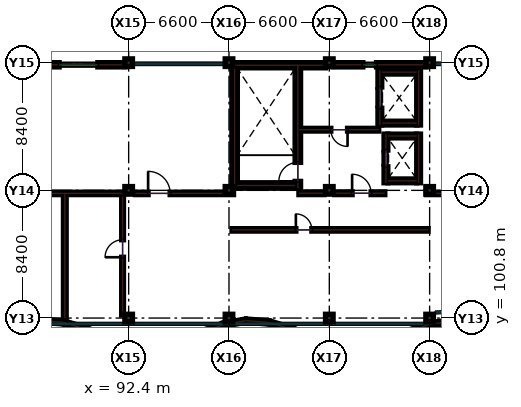
"""IFC4 building model, lengths in metres.
Left out: names, types, materials, properties, quantities, classifications, styles, units other than length and angle.
Written with IfcOpenShell. Run it as: python <this file> out.ifc"""

import sys

from ifc_helpers import new_model, si_unit, direction, frame, frame_2d, origin, origin_2d, place, context, subcontext, project, spatial, rectangle, extrude, element, fill, save


model = new_model("IFC4")
c1 = context("Model", 3, precision=1e-05, world=origin(), true_north=direction((0.0, 1.0)))
c2 = subcontext(c1, "Body", "Model", "MODEL_VIEW")
j1 = project(units=[si_unit("LENGTHUNIT", "METRE"), si_unit("PLANEANGLEUNIT", "RADIAN")], contexts=[c1])
p1 = place(None, origin())
s1 = spatial("IfcSite", under=j1, at=p1, CompositionType="ELEMENT")
p2 = place(p1, origin())
s2 = spatial("IfcBuilding", under=s1, at=p2, CompositionType="ELEMENT")
p3 = place(p2, frame((0.0, 0.0, 22.8)))
s3 = spatial("IfcBuildingStorey", under=s2, at=p3, CompositionType="ELEMENT", Elevation=22.8)
for number, where, z_axis, x_axis in (
    (1, (92.4, 100.8, 0.0), (0.0, 0.0, 1.0), (1.0, 0.0, 0.0)),
    (2, (92.4, 109.2, 0.0), (0.0, 0.0, 1.0), (1.0, 0.0, 0.0)),
    (3, (92.4, 117.6, 0.0), (0.0, 0.0, 1.0), (1.0, 0.0, 0.0)),
    (4, (99.0, 100.8, 0.0), (0.0, 0.0, 1.0), (1.0, 0.0, 0.0)),
    (5, (99.0, 109.2, 0.0), (0.0, 0.0, 1.0), (1.0, 0.0, 0.0)),
    (6, (99.0, 117.6, 0.0), (0.0, 0.0, 1.0), (1.0, 0.0, 0.0)),
    (7, (105.6, 100.8, 0.0), (0.0, 0.0, 1.0), (1.0, 0.0, 0.0)),
    (8, (105.6, 109.2, 0.0), (0.0, 0.0, 1.0), (1.0, 0.0, 0.0)),
    (9, (105.6, 117.6, 0.0), (0.0, 0.0, 1.0), (1.0, 0.0, 0.0)),
    (10, (112.2, 100.8, 0.0), (0.0, 0.0, 1.0), (1.0, 0.0, 0.0)),
    (11, (112.2, 109.2, 0.0), (0.0, 0.0, 1.0), (1.0, 0.0, 0.0)),
    (12, (112.2, 117.6, 0.0), (0.0, 0.0, 1.0), (1.0, 0.0, 0.0)),
):
    element("IfcColumn", number, at=place(p3, frame(where, z_axis=z_axis, x_axis=x_axis)), inside=s3, PredefinedType="COLUMN", context=c2, shape_type="SweptSolid", body=[
        extrude(rectangle(XDim=0.5, YDim=0.5, at=origin_2d()), origin(), (0.0, 0.0, 1.0), 4.2),
    ])
p4 = place(p3, frame((86.25, 109.0, 0.0), z_axis=(0.0, 0.0, 1.0), x_axis=(1.0, 0.0, 0.0)))
e13 = element("IfcWall", 13, at=p4, inside=s3, PredefinedType="PARTITIONING", context=c2, shape_type="SweptSolid", body=[
    extrude(rectangle(XDim=5.7, YDim=0.16, at=frame_2d((2.85, 0.0))), origin(), (0.0, 0.0, 1.0), 3.195),
])
p5 = place(p3, frame((92.85, 109.0, 0.0), z_axis=(0.0, 0.0, 1.0), x_axis=(1.0, 0.0, 0.0)))
e14 = element("IfcWall", 14, at=p5, inside=s3, PredefinedType="PARTITIONING", context=c2, shape_type="SweptSolid", body=[
    extrude(rectangle(XDim=6.45, YDim=0.16, at=frame_2d((3.225, 0.0))), origin(), (0.0, 0.0, 1.0), 3.195),
])
p6 = place(p5, frame((0.83, 0.0, 0.0)))
e15 = element("IfcOpeningElement", 15, at=p6, cuts=e14, PredefinedType="OPENING", context=c2, shape_type="SweptSolid", body=[
    extrude(rectangle(XDim=1.45, YDim=2.25, at=frame_2d((0.725, 1.125))), frame((0.0, 0.09, 0.0), z_axis=(0.0, -1.0, 0.0), x_axis=(1.0, 0.0, 0.0)), (0.0, 0.0, 1.0), 0.18),
])
p7 = place(p3, frame((112.0, 109.0, 0.0), z_axis=(0.0, 0.0, 1.0), x_axis=(1.0, 0.0, 0.0)))
e16 = element("IfcWall", 16, at=p7, inside=s3, PredefinedType="PARTITIONING", context=c2, shape_type="SweptSolid", body=[
    extrude(rectangle(XDim=6.35, YDim=0.16, at=frame_2d((3.175, 0.0))), origin(), (0.0, 0.0, 1.0), 3.195),
])
p8 = place(p7, frame((4.05, 0.0, 0.0)))
e17 = element("IfcOpeningElement", 17, at=p8, cuts=e16, PredefinedType="OPENING", context=c2, shape_type="SweptSolid", body=[
    extrude(rectangle(XDim=1.95, YDim=2.35, at=frame_2d((0.975, 1.175))), frame((0.0, 0.09, 0.0), z_axis=(0.0, -1.0, 0.0), x_axis=(1.0, 0.0, 0.0)), (0.0, 0.0, 1.0), 0.18),
])
p9 = place(p3, frame((88.2, 100.8, 0.0), z_axis=(0.0, 0.0, 1.0), x_axis=(0.0, 1.0, 0.0)))
e18 = element("IfcWall", 18, at=p9, inside=s3, PredefinedType="SOLIDWALL", context=c2, shape_type="SweptSolid", body=[
    extrude(rectangle(XDim=8.2, YDim=0.18, at=frame_2d((4.1, 0.0))), origin(), (0.0, 0.0, 1.0), 3.23),
])
p10 = place(p3, frame((92.0, 101.0, 0.0), z_axis=(0.0, 0.0, 1.0), x_axis=(0.0, 1.0, 0.0)))
e19 = element("IfcWall", 19, at=p10, inside=s3, PredefinedType="PARTITIONING", context=c2, shape_type="SweptSolid", body=[
    extrude(rectangle(XDim=8.0, YDim=0.12, at=frame_2d((4.0, 0.0))), origin(), (0.0, 0.0, 1.0), 3.23),
])
p11 = place(p10, frame((3.8, 0.0, 0.0)))
e20 = element("IfcOpeningElement", 20, at=p11, cuts=e19, PredefinedType="OPENING", context=c2, shape_type="SweptSolid", body=[
    extrude(rectangle(XDim=1.15, YDim=2.2, at=frame_2d((0.575, 1.1))), frame((0.0, 0.07, 0.0), z_axis=(0.0, -1.0, 0.0), x_axis=(1.0, 0.0, 0.0)), (0.0, 0.0, 1.0), 0.14),
])
p12 = place(p3, frame((99.2, 106.6, 0.0), z_axis=(0.0, 0.0, 1.0), x_axis=(1.0, 0.0, 0.0)))
e21 = element("IfcWall", 21, at=p12, inside=s3, PredefinedType="PARTITIONING", context=c2, shape_type="SweptSolid", body=[
    extrude(rectangle(XDim=12.9, YDim=0.16, at=frame_2d((6.45, 0.0))), origin(), (0.0, 0.0, 1.0), 3.23),
])
p13 = place(p12, frame((4.2, 0.0, 0.0)))
e22 = element("IfcOpeningElement", 22, at=p13, cuts=e21, PredefinedType="OPENING", context=c2, shape_type="SweptSolid", body=[
    extrude(rectangle(XDim=1.05, YDim=2.15, at=frame_2d((0.525, 1.075))), frame((0.0, 0.09, 0.0), z_axis=(0.0, -1.0, 0.0), x_axis=(1.0, 0.0, 0.0)), (0.0, 0.0, 1.0), 0.18),
])
p14 = place(p3, frame((92.155, 117.46, 0.0), z_axis=(0.0, 0.0, 1.0), x_axis=(-1.0, 0.0, 0.0)))
e23 = element("IfcWall", 23, at=p14, inside=s3, PredefinedType="SOLIDWALL", context=c2, shape_type="SweptSolid", body=[
    extrude(rectangle(XDim=6.11, YDim=0.28, at=frame_2d((3.055, 0.0))), origin(), (0.0, 0.0, 1.0), 3.345),
])
p15 = place(p14, frame((1.78, 0.0, 0.95)))
e24 = element("IfcOpeningElement", 24, at=p15, cuts=e23, PredefinedType="OPENING", context=c2, shape_type="SweptSolid", body=[
    extrude(rectangle(XDim=2.55, YDim=1.65, at=frame_2d((1.275, 0.825))), frame((0.0, 0.15, 0.0), z_axis=(0.0, -1.0, 0.0), x_axis=(1.0, 0.0, 0.0)), (0.0, 0.0, 1.0), 0.3),
])
p16 = place(p3, frame((105.355, 117.43, 0.0), z_axis=(0.0, 0.0, 1.0), x_axis=(-1.0, 0.0, 0.0)))
e25 = element("IfcWall", 25, at=p16, inside=s3, PredefinedType="SHEAR", context=c2, shape_type="SweptSolid", body=[
    extrude(rectangle(XDim=6.11, YDim=0.34, at=frame_2d((3.055, 0.0))), origin(), (0.0, 0.0, 1.0), 3.98),
])
p17 = place(p3, frame((111.955, 117.46, 0.0), z_axis=(0.0, 0.0, 1.0), x_axis=(-1.0, 0.0, 0.0)))
e26 = element("IfcWall", 26, at=p17, inside=s3, PredefinedType="SOLIDWALL", context=c2, shape_type="SweptSolid", body=[
    extrude(rectangle(XDim=6.11, YDim=0.28, at=frame_2d((3.055, 0.0))), origin(), (0.0, 0.0, 1.0), 3.345),
])
p18 = place(p17, frame((3.25, 0.0, 0.95)))
e27 = element("IfcOpeningElement", 27, at=p18, cuts=e26, PredefinedType="OPENING", context=c2, shape_type="SweptSolid", body=[
    extrude(rectangle(XDim=0.9, YDim=1.4, at=frame_2d((0.45, 0.7))), frame((0.0, 0.15, 0.0), z_axis=(0.0, -1.0, 0.0), x_axis=(1.0, 0.0, 0.0)), (0.0, 0.0, 1.0), 0.3),
])
p19 = place(p3, frame((86.565, 100.63, 0.0), z_axis=(0.0, 0.0, 1.0), x_axis=(0.997363695451, -0.072564860623, 0.0)))
e28 = element("IfcWall", 28, at=p19, inside=s3, PredefinedType="SOLIDWALL", context=c2, shape_type="SweptSolid", body=[
    extrude(rectangle(XDim=1.514, YDim=0.22, at=frame_2d((0.757, 0.0))), origin(), (0.0, 0.0, 1.0), 1.45),
])
p20 = place(p3, frame((88.105, 100.515, 0.0), z_axis=(0.0, 0.0, 1.0), x_axis=(0.958103864289, -0.286420993006, 0.0)))
e29 = element("IfcWall", 29, at=p20, inside=s3, PredefinedType="SOLIDWALL", context=c2, shape_type="SweptSolid", body=[
    extrude(rectangle(XDim=1.571, YDim=0.22, at=frame_2d((0.786, 0.0))), origin(), (0.0, 0.0, 1.0), 1.45),
])
p21 = place(p3, frame((97.07, 99.81, 0.0), z_axis=(0.0, 0.0, 1.0), x_axis=(0.941593715183, 0.336751058688, 0.0)))
e30 = element("IfcWall", 30, at=p21, inside=s3, PredefinedType="SOLIDWALL", context=c2, shape_type="SweptSolid", body=[
    extrude(rectangle(XDim=1.604, YDim=0.22, at=frame_2d((0.802, 0.0))), origin(), (0.0, 0.0, 1.0), 1.45),
])
p22 = place(p3, frame((98.6, 100.36, 0.0), z_axis=(0.0, 0.0, 1.0), x_axis=(0.984308919427, 0.176453821539, 0.0)))
e31 = element("IfcWall", 31, at=p22, inside=s3, PredefinedType="SOLIDWALL", context=c2, shape_type="SweptSolid", body=[
    extrude(rectangle(XDim=1.529, YDim=0.22, at=frame_2d((0.764, 0.0))), origin(), (0.0, 0.0, 1.0), 1.45),
])
p23 = place(p3, frame((100.14, 100.63, 0.0), z_axis=(0.0, 0.0, 1.0), x_axis=(0.996591169262, -0.082498735434, 0.0)))
e32 = element("IfcWall", 32, at=p23, inside=s3, PredefinedType="SOLIDWALL", context=c2, shape_type="SweptSolid", body=[
    extrude(rectangle(XDim=1.515, YDim=0.22, at=frame_2d((0.758, 0.0))), origin(), (0.0, 0.0, 1.0), 1.45),
])
p24 = place(p3, frame((101.68, 100.5, 0.0), z_axis=(0.0, 0.0, 1.0), x_axis=(0.95569544679, -0.294357287977, 0.0)))
e33 = element("IfcWall", 33, at=p24, inside=s3, PredefinedType="SOLIDWALL", context=c2, shape_type="SweptSolid", body=[
    extrude(rectangle(XDim=1.58, YDim=0.22, at=frame_2d((0.79, 0.0))), origin(), (0.0, 0.0, 1.0), 1.45),
])
p25 = place(p3, frame((110.645, 99.84, 0.0), z_axis=(0.0, 0.0, 1.0), x_axis=(0.943560676249, 0.331199713522, 0.0)))
e34 = element("IfcWall", 34, at=p25, inside=s3, PredefinedType="SOLIDWALL", context=c2, shape_type="SweptSolid", body=[
    extrude(rectangle(XDim=1.6, YDim=0.22, at=frame_2d((0.8, 0.0))), origin(), (0.0, 0.0, 1.0), 1.45),
])
p26 = place(p3, frame((112.18, 100.38, 0.0), z_axis=(0.0, 0.0, 1.0), x_axis=(0.990109991905, 0.140293278275, 0.0)))
e35 = element("IfcWall", 35, at=p26, inside=s3, PredefinedType="SOLIDWALL", context=c2, shape_type="SweptSolid", body=[
    extrude(rectangle(XDim=2.424, YDim=0.22, at=frame_2d((1.212, 0.0))), origin(), (0.0, 0.0, 1.0), 1.45),
])
p27 = place(p3, frame((99.37, 109.34, 0.0), z_axis=(0.0, 0.0, 1.0), x_axis=(0.0, 1.0, 0.0)))
e36 = element("IfcWall", 36, at=p27, inside=s3, PredefinedType="SHEAR", context=c2, shape_type="SweptSolid", body=[
    extrude(rectangle(XDim=8.09, YDim=0.36, at=frame_2d((4.045, 0.0))), origin(), (0.0, 0.0, 1.0), 3.96),
])
p28 = place(p3, frame((103.53, 109.34, 0.0), z_axis=(0.0, 0.0, 1.0), x_axis=(0.0, 1.0, 0.0)))
e37 = element("IfcWall", 37, at=p28, inside=s3, PredefinedType="SHEAR", context=c2, shape_type="SweptSolid", body=[
    extrude(rectangle(XDim=8.09, YDim=0.36, at=frame_2d((4.045, 0.0))), origin(), (0.0, 0.0, 1.0), 3.96),
])
p29 = place(p28, frame((0.45, 0.0, 0.0)))
e38 = element("IfcOpeningElement", 38, at=p29, cuts=e37, PredefinedType="OPENING", context=c2, shape_type="SweptSolid", body=[
    extrude(rectangle(XDim=1.25, YDim=2.15, at=frame_2d((0.625, 1.075))), frame((0.0, 0.19, 0.0), z_axis=(0.0, -1.0, 0.0), x_axis=(1.0, 0.0, 0.0)), (0.0, 0.0, 1.0), 0.38),
])
p30 = place(p3, frame((99.55, 109.52, 0.0), z_axis=(0.0, 0.0, 1.0), x_axis=(1.0, 0.0, 0.0)))
e39 = element("IfcWall", 39, at=p30, inside=s3, PredefinedType="SHEAR", context=c2, shape_type="SweptSolid", body=[
    extrude(rectangle(XDim=3.8, YDim=0.36, at=frame_2d((1.9, 0.0))), origin(), (0.0, 0.0, 1.0), 3.96),
])
p31 = place(p3, frame((109.325, 109.7, 0.0), z_axis=(0.0, 0.0, 1.0), x_axis=(0.0, 1.0, 0.0)))
e40 = element("IfcWall", 40, at=p31, inside=s3, PredefinedType="SHEAR", context=c2, shape_type="SweptSolid", body=[
    extrude(rectangle(XDim=3.2, YDim=0.25, at=frame_2d((1.6, 0.0))), origin(), (0.0, 0.0, 1.0), 3.96),
])
p32 = place(p31, frame((1.05, 0.0, 0.0)))
e41 = element("IfcOpeningElement", 41, at=p32, cuts=e40, PredefinedType="OPENING", context=c2, shape_type="SweptSolid", body=[
    extrude(rectangle(XDim=1.1, YDim=2.15, at=frame_2d((0.55, 1.075))), frame((0.0, 0.135, 0.0), z_axis=(0.0, -1.0, 0.0), x_axis=(1.0, 0.0, 0.0)), (0.0, 0.0, 1.0), 0.27),
])
p33 = place(p3, frame((111.475, 109.7, 0.0), z_axis=(0.0, 0.0, 1.0), x_axis=(0.0, 1.0, 0.0)))
e42 = element("IfcWall", 42, at=p33, inside=s3, PredefinedType="SHEAR", context=c2, shape_type="SweptSolid", body=[
    extrude(rectangle(XDim=3.2, YDim=0.25, at=frame_2d((1.6, 0.0))), origin(), (0.0, 0.0, 1.0), 3.96),
])
for number, where, z_axis, x_axis in (
    (43, (109.45, 109.825, 0.0), (0.0, 0.0, 1.0), (1.0, 0.0, 0.0)),
    (44, (109.45, 112.775, 0.0), (0.0, 0.0, 1.0), (1.0, 0.0, 0.0)),
):
    element("IfcWall", number, at=place(p3, frame(where, z_axis=z_axis, x_axis=x_axis)), inside=s3, PredefinedType="SHEAR", context=c2, shape_type="SweptSolid", body=[
        extrude(rectangle(XDim=1.9, YDim=0.25, at=frame_2d((0.95, 0.0))), origin(), (0.0, 0.0, 1.0), 3.96),
    ])
p34 = place(p3, frame((108.925, 113.5, 0.0), z_axis=(0.0, 0.0, 1.0), x_axis=(0.0, 1.0, 0.0)))
e45 = element("IfcWall", 45, at=p34, inside=s3, PredefinedType="SHEAR", context=c2, shape_type="SweptSolid", body=[
    extrude(rectangle(XDim=3.6, YDim=0.25, at=frame_2d((1.8, 0.0))), origin(), (0.0, 0.0, 1.0), 3.96),
])
p35 = place(p34, frame((1.1, 0.0, 0.0)))
e46 = element("IfcOpeningElement", 46, at=p35, cuts=e45, PredefinedType="OPENING", context=c2, shape_type="SweptSolid", body=[
    extrude(rectangle(XDim=1.4, YDim=2.2, at=frame_2d((0.7, 1.1))), frame((0.0, 0.135, 0.0), z_axis=(0.0, -1.0, 0.0), x_axis=(1.0, 0.0, 0.0)), (0.0, 0.0, 1.0), 0.27),
])
p36 = place(p3, frame((111.475, 113.5, 0.0), z_axis=(0.0, 0.0, 1.0), x_axis=(0.0, 1.0, 0.0)))
e47 = element("IfcWall", 47, at=p36, inside=s3, PredefinedType="SHEAR", context=c2, shape_type="SweptSolid", body=[
    extrude(rectangle(XDim=3.6, YDim=0.25, at=frame_2d((1.8, 0.0))), origin(), (0.0, 0.0, 1.0), 3.96),
])
for number, where, z_axis, x_axis in (
    (48, (109.05, 113.625, 0.0), (0.0, 0.0, 1.0), (1.0, 0.0, 0.0)),
    (49, (109.05, 116.975, 0.0), (0.0, 0.0, 1.0), (1.0, 0.0, 0.0)),
):
    element("IfcWall", number, at=place(p3, frame(where, z_axis=z_axis, x_axis=x_axis)), inside=s3, PredefinedType="SHEAR", context=c2, shape_type="SweptSolid", body=[
        extrude(rectangle(XDim=2.3, YDim=0.25, at=frame_2d((1.15, 0.0))), origin(), (0.0, 0.0, 1.0), 3.96),
    ])
p37 = place(p3, frame((103.6, 109.01, 0.0), z_axis=(0.0, 0.0, 1.0), x_axis=(1.0, 0.0, 0.0)))
e50 = element("IfcWall", 50, at=p37, inside=s3, PredefinedType="SOLIDWALL", context=c2, shape_type="SweptSolid", body=[
    extrude(rectangle(XDim=1.65, YDim=0.18, at=frame_2d((0.825, 0.0))), origin(), (0.0, 0.0, 1.0), 3.195),
])
p38 = place(p3, frame((105.95, 109.01, 0.0), z_axis=(0.0, 0.0, 1.0), x_axis=(1.0, 0.0, 0.0)))
e51 = element("IfcWall", 51, at=p38, inside=s3, PredefinedType="SOLIDWALL", context=c2, shape_type="SweptSolid", body=[
    extrude(rectangle(XDim=3.3, YDim=0.18, at=frame_2d((1.65, 0.0))), origin(), (0.0, 0.0, 1.0), 3.195),
])
p39 = place(p38, frame((1.15, 0.0, 0.0)))
e52 = element("IfcOpeningElement", 52, at=p39, cuts=e51, PredefinedType="OPENING", context=c2, shape_type="SweptSolid", body=[
    extrude(rectangle(XDim=1.25, YDim=2.15, at=frame_2d((0.625, 1.075))), frame((0.0, 0.1, 0.0), z_axis=(0.0, -1.0, 0.0), x_axis=(1.0, 0.0, 0.0)), (0.0, 0.0, 1.0), 0.2),
])
p40 = place(p3, frame((103.6, 113.19, 0.0), z_axis=(0.0, 0.0, 1.0), x_axis=(1.0, 0.0, 0.0)))
e53 = element("IfcWall", 53, at=p40, inside=s3, PredefinedType="SOLIDWALL", context=c2, shape_type="SweptSolid", body=[
    extrude(rectangle(XDim=5.25, YDim=0.18, at=frame_2d((2.625, 0.0))), origin(), (0.0, 0.0, 1.0), 3.96),
])
p41 = place(p40, frame((2.1, 0.0, 0.0)))
e54 = element("IfcOpeningElement", 54, at=p41, cuts=e53, PredefinedType="OPENING", context=c2, shape_type="SweptSolid", body=[
    extrude(rectangle(XDim=1.1, YDim=2.15, at=frame_2d((0.55, 1.075))), frame((0.0, 0.1, 0.0), z_axis=(0.0, -1.0, 0.0), x_axis=(1.0, 0.0, 0.0)), (0.0, 0.0, 1.0), 0.2),
])
p42 = place(p6, origin())
e55 = element("IfcDoor", 55, at=p42, inside=s3, OperationType="SINGLE_SWING_LEFT", PredefinedType="DOOR", context=c2, shape_type="SweptSolid", body=[
    extrude(rectangle(XDim=1.45, YDim=2.25, at=frame_2d((0.725, 1.125))), frame((0.0, 0.025, 0.0), z_axis=(0.0, -1.0, 0.0), x_axis=(1.0, 0.0, 0.0)), (0.0, 0.0, 1.0), 0.05),
])
fill(e15, e55)
p43 = place(p11, origin())
e56 = element("IfcDoor", 56, at=p43, inside=s3, OperationType="SINGLE_SWING_LEFT", PredefinedType="DOOR", context=c2, shape_type="SweptSolid", body=[
    extrude(rectangle(XDim=1.15, YDim=2.2, at=frame_2d((0.575, 1.1))), frame((0.0, 0.025, 0.0), z_axis=(0.0, -1.0, 0.0), x_axis=(1.0, 0.0, 0.0)), (0.0, 0.0, 1.0), 0.05),
])
fill(e20, e56)
p44 = place(p13, origin())
e57 = element("IfcDoor", 57, at=p44, inside=s3, OperationType="SINGLE_SWING_LEFT", PredefinedType="DOOR", context=c2, shape_type="SweptSolid", body=[
    extrude(rectangle(XDim=1.05, YDim=2.15, at=frame_2d((0.525, 1.075))), frame((0.0, 0.025, 0.0), z_axis=(0.0, -1.0, 0.0), x_axis=(1.0, 0.0, 0.0)), (0.0, 0.0, 1.0), 0.05),
])
fill(e22, e57)
p45 = place(p15, origin())
e58 = element("IfcWindow", 58, at=p45, inside=s3, PartitioningType="SINGLE_PANEL", PredefinedType="WINDOW", context=c2, shape_type="SweptSolid", body=[
    extrude(rectangle(XDim=2.55, YDim=1.65, at=frame_2d((1.275, 0.825))), frame((0.0, 0.03, 0.0), z_axis=(0.0, -1.0, 0.0), x_axis=(1.0, 0.0, 0.0)), (0.0, 0.0, 1.0), 0.06),
])
fill(e24, e58)
p46 = place(p18, origin())
e59 = element("IfcWindow", 59, at=p46, inside=s3, PartitioningType="SINGLE_PANEL", PredefinedType="WINDOW", context=c2, shape_type="SweptSolid", body=[
    extrude(rectangle(XDim=0.9, YDim=1.4, at=frame_2d((0.45, 0.7))), frame((0.0, 0.03, 0.0), z_axis=(0.0, -1.0, 0.0), x_axis=(1.0, 0.0, 0.0)), (0.0, 0.0, 1.0), 0.06),
])
fill(e27, e59)
p47 = place(p29, origin())
e60 = element("IfcDoor", 60, at=p47, inside=s3, OperationType="SINGLE_SWING_LEFT", PredefinedType="DOOR", context=c2, shape_type="SweptSolid", body=[
    extrude(rectangle(XDim=1.25, YDim=2.15, at=frame_2d((0.625, 1.075))), frame((0.0, 0.025, 0.0), z_axis=(0.0, -1.0, 0.0), x_axis=(1.0, 0.0, 0.0)), (0.0, 0.0, 1.0), 0.05),
])
fill(e38, e60)
p48 = place(p32, origin())
e61 = element("IfcDoor", 61, at=p48, inside=s3, OperationType="SLIDING_TO_LEFT", PredefinedType="DOOR", context=c2, shape_type="SweptSolid", body=[
    extrude(rectangle(XDim=1.1, YDim=2.15, at=frame_2d((0.55, 1.075))), frame((0.0, 0.025, 0.0), z_axis=(0.0, -1.0, 0.0), x_axis=(1.0, 0.0, 0.0)), (0.0, 0.0, 1.0), 0.05),
])
fill(e41, e61)
p49 = place(p35, origin())
e62 = element("IfcDoor", 62, at=p49, inside=s3, OperationType="SLIDING_TO_LEFT", PredefinedType="DOOR", context=c2, shape_type="SweptSolid", body=[
    extrude(rectangle(XDim=1.4, YDim=2.2, at=frame_2d((0.7, 1.1))), frame((0.0, 0.025, 0.0), z_axis=(0.0, -1.0, 0.0), x_axis=(1.0, 0.0, 0.0)), (0.0, 0.0, 1.0), 0.05),
])
fill(e46, e62)
p50 = place(p39, origin())
e63 = element("IfcDoor", 63, at=p50, inside=s3, OperationType="SINGLE_SWING_LEFT", PredefinedType="DOOR", context=c2, shape_type="SweptSolid", body=[
    extrude(rectangle(XDim=1.25, YDim=2.15, at=frame_2d((0.625, 1.075))), frame((0.0, 0.025, 0.0), z_axis=(0.0, -1.0, 0.0), x_axis=(1.0, 0.0, 0.0)), (0.0, 0.0, 1.0), 0.05),
])
fill(e52, e63)
p51 = place(p41, frame((1.1, 0.0, 0.0), z_axis=(0.0, 0.0, 1.0), x_axis=(-1.0, 0.0, 0.0)))
e64 = element("IfcDoor", 64, at=p51, inside=s3, OperationType="SINGLE_SWING_RIGHT", PredefinedType="DOOR", context=c2, shape_type="SweptSolid", body=[
    extrude(rectangle(XDim=1.1, YDim=2.15, at=frame_2d((0.55, 1.075))), frame((0.0, 0.025, 0.0), z_axis=(0.0, -1.0, 0.0), x_axis=(1.0, 0.0, 0.0)), (0.0, 0.0, 1.0), 0.05),
])
fill(e54, e64)
save(model, sys.argv[1])
